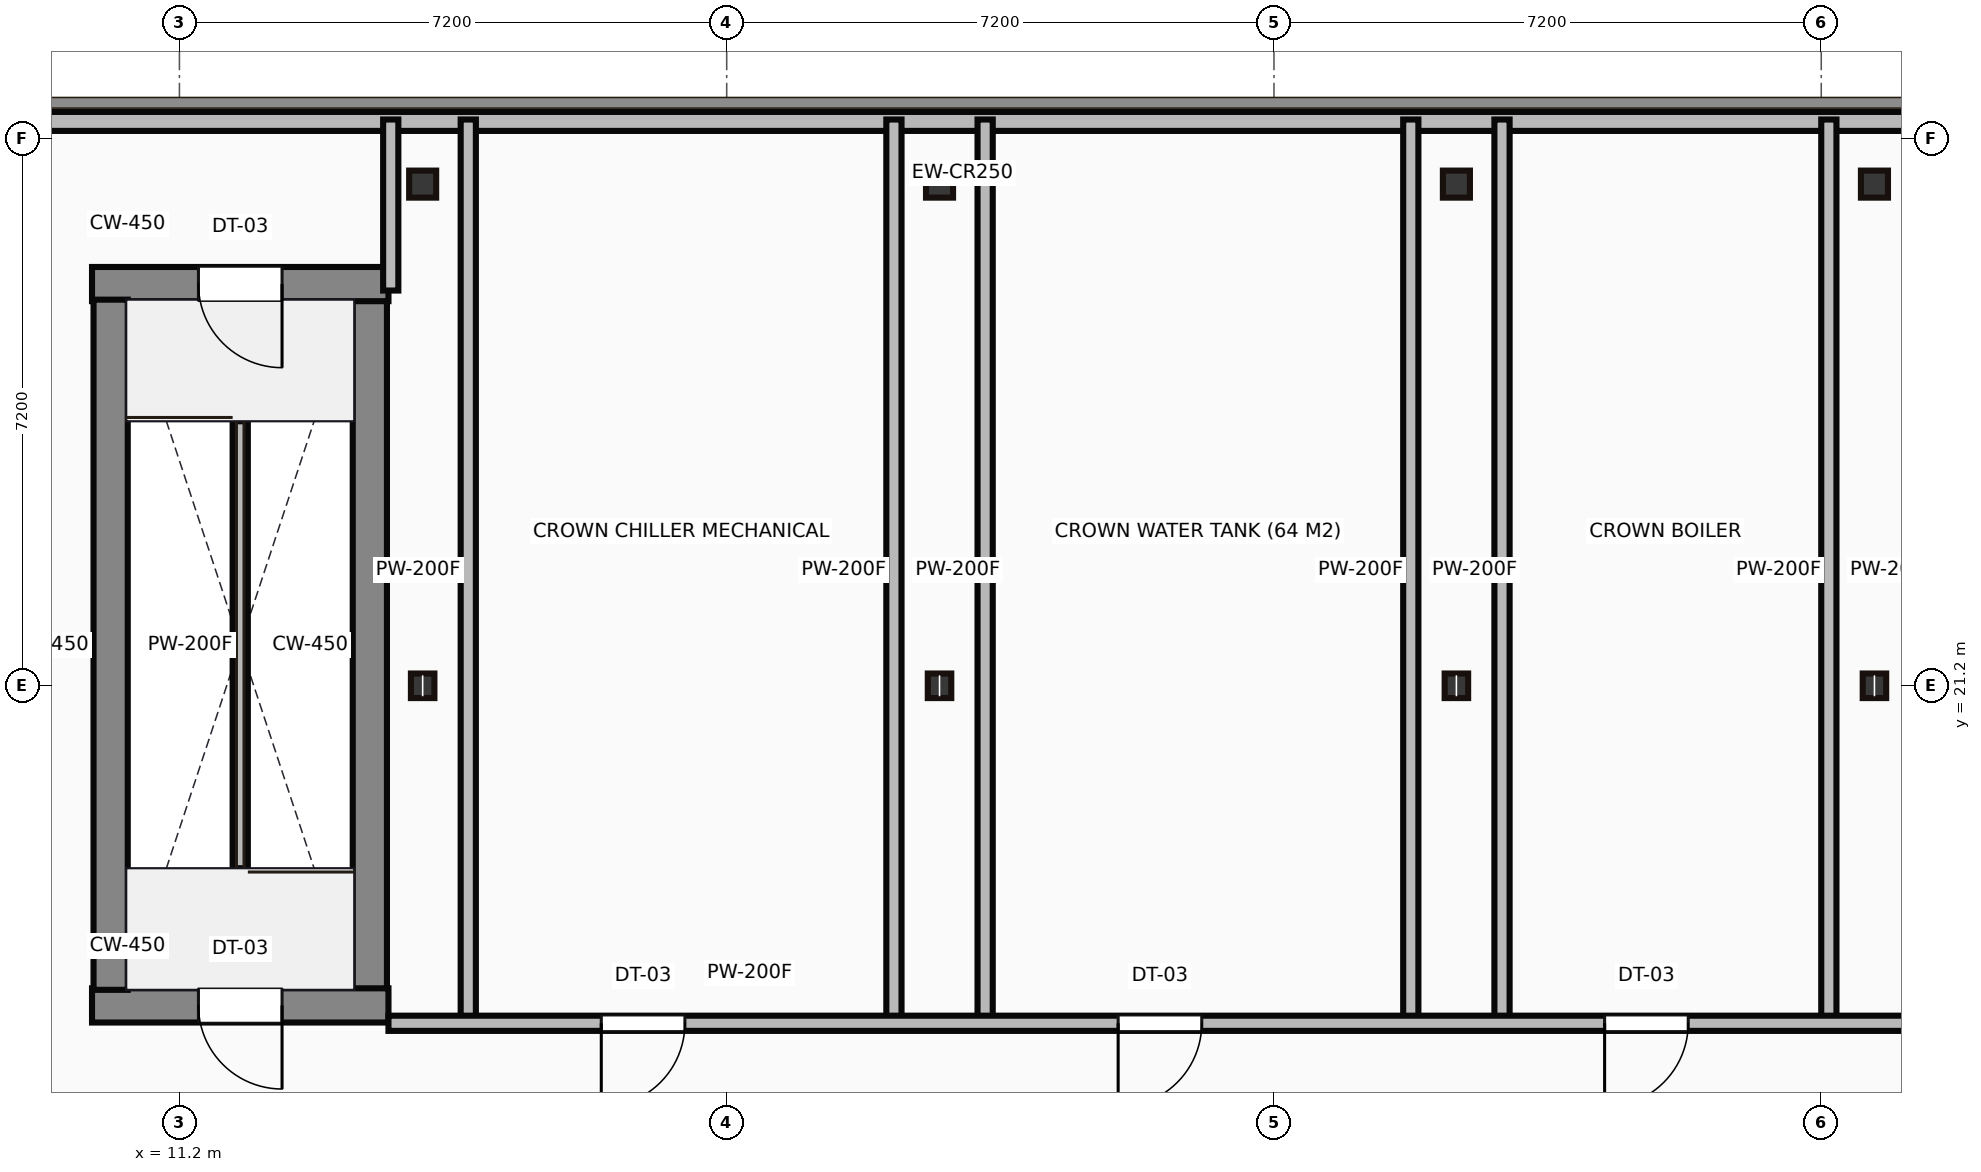
"""IFC4 building model, lengths in metres.
Left out: names, types, materials, properties, quantities, classifications, styles, units other than length and angle.
Written with IfcOpenShell. Run it as: python <this file> out.ifc"""

import sys

from ifc_helpers import new_model, si_unit, direction, frame, frame_2d, origin, origin_2d, place, context, subcontext, project, spatial, rectangle, hollow_rectangle, i_section, extrude, source, transform, mapped, element, fill, save


model = new_model("IFC4")
c1 = context("Model", 3, precision=1e-05, world=origin(), true_north=direction((0.0, 1.0)))
c2 = subcontext(c1, "Body", "Model", "MODEL_VIEW")
j1 = project(units=[si_unit("LENGTHUNIT", "METRE"), si_unit("PLANEANGLEUNIT", "RADIAN")], contexts=[c1])
p1 = place(None, origin())
s1 = spatial("IfcSite", under=j1, at=p1, CompositionType="ELEMENT")
p2 = place(p1, origin())
s2 = spatial("IfcBuilding", under=s1, at=p2, CompositionType="ELEMENT")
p3 = place(p2, frame((0.0, 0.0, 311.25)))
s3 = spatial("IfcBuildingStorey", under=s2, at=p3, CompositionType="ELEMENT", Elevation=311.25)
m1 = source(origin(), c2, "Body", "SweptSolid", [
    extrude(i_section(OverallWidth=0.309, OverallDepth=0.323, WebThickness=0.014, FlangeThickness=0.023, at=origin_2d()), origin(), (0.0, 0.0, 1.0), 3.8),
])
p4 = place(p3, frame((14.4, 21.2, 0.0), z_axis=(0.0, 0.0, 1.0), x_axis=(1.0, 0.0, 0.0)))
e1 = element("IfcColumn", 1, at=p4, inside=s3, PredefinedType="COLUMN", context=c2, shape_type="MappedRepresentation", body=[
    mapped(m1, transform((0.0, 0.0, 0.0))),
])
m2 = source(origin(), c2, "Body", "SweptSolid", [
    extrude(hollow_rectangle(XDim=0.356, YDim=0.356, WallThickness=0.019, at=origin_2d()), origin(), (0.0, 0.0, 1.0), 3.8),
])
p5 = place(p3, frame((14.4, 27.8, 0.0), z_axis=(0.0, 0.0, 1.0), x_axis=(1.0, 0.0, 0.0)))
e2 = element("IfcColumn", 2, at=p5, inside=s3, PredefinedType="COLUMN", context=c2, shape_type="MappedRepresentation", body=[
    mapped(m2, transform((0.0, 0.0, 0.0))),
])
p6 = place(p3, frame((21.2, 21.2, 0.0), z_axis=(0.0, 0.0, 1.0), x_axis=(1.0, 0.0, 0.0)))
e3 = element("IfcColumn", 3, at=p6, inside=s3, PredefinedType="COLUMN", context=c2, shape_type="MappedRepresentation", body=[
    mapped(m1, transform((0.0, 0.0, 0.0))),
])
p7 = place(p3, frame((21.2, 27.8, 0.0), z_axis=(0.0, 0.0, 1.0), x_axis=(1.0, 0.0, 0.0)))
e4 = element("IfcColumn", 4, at=p7, inside=s3, PredefinedType="COLUMN", context=c2, shape_type="MappedRepresentation", body=[
    mapped(m2, transform((0.0, 0.0, 0.0))),
])
p8 = place(p3, frame((28.0, 21.2, 0.0), z_axis=(0.0, 0.0, 1.0), x_axis=(1.0, 0.0, 0.0)))
e5 = element("IfcColumn", 5, at=p8, inside=s3, PredefinedType="COLUMN", context=c2, shape_type="MappedRepresentation", body=[
    mapped(m1, transform((0.0, 0.0, 0.0))),
])
p9 = place(p3, frame((28.0, 27.8, 0.0), z_axis=(0.0, 0.0, 1.0), x_axis=(1.0, 0.0, 0.0)))
e6 = element("IfcColumn", 6, at=p9, inside=s3, PredefinedType="COLUMN", context=c2, shape_type="MappedRepresentation", body=[
    mapped(m2, transform((0.0, 0.0, 0.0))),
])
p10 = place(p3, frame((33.5, 21.2, 0.0), z_axis=(0.0, 0.0, 1.0), x_axis=(1.0, 0.0, 0.0)))
e7 = element("IfcColumn", 7, at=p10, inside=s3, PredefinedType="COLUMN", context=c2, shape_type="MappedRepresentation", body=[
    mapped(m1, transform((0.0, 0.0, 0.0))),
])
p11 = place(p3, frame((33.5, 27.8, 0.0), z_axis=(0.0, 0.0, 1.0), x_axis=(1.0, 0.0, 0.0)))
e8 = element("IfcColumn", 8, at=p11, inside=s3, PredefinedType="COLUMN", context=c2, shape_type="MappedRepresentation", body=[
    mapped(m2, transform((0.0, 0.0, 0.0))),
])
m3 = source(origin(), c2, "Body", "SweptSolid", [
    extrude(rectangle(XDim=35.0, YDim=0.25, at=frame_2d((17.5, 0.0))), origin(), (0.0, 0.0, 1.0), 3.5),
])
p12 = place(p3, frame((39.0, 28.625, 0.0), z_axis=(0.0, 0.0, 1.0), x_axis=(-1.0, 0.0, 0.0)))
e9 = element("IfcWall", 9, at=p12, inside=s3, PredefinedType="STANDARD", context=c2, shape_type="MappedRepresentation", body=[
    mapped(m3, transform((0.0, 0.0, 0.0))),
])
m4 = source(origin(), c2, "Body", "SweptSolid", [
    extrude(rectangle(XDim=3.9, YDim=0.45, at=frame_2d((1.95, 0.0))), origin(), (0.0, 0.0, 1.0), 3.5),
])
p13 = place(p3, frame((10.05, 16.995, 0.0), z_axis=(0.0, 0.0, 1.0), x_axis=(1.0, 0.0, 0.0)))
e10 = element("IfcWall", 10, at=p13, inside=s3, PredefinedType="SHEAR", context=c2, shape_type="MappedRepresentation", body=[
    mapped(m4, transform((0.0, 0.0, 0.0))),
])
p14 = place(p13, frame((1.4, 0.0, 0.0)))
e11 = element("IfcOpeningElement", 11, at=p14, cuts=e10, PredefinedType="OPENING", context=c2, shape_type="SweptSolid", body=[
    extrude(rectangle(XDim=1.1, YDim=2.15, at=frame_2d((0.55, 1.075))), frame((0.0, 0.235, 0.0), z_axis=(0.0, -1.0, 0.0), x_axis=(1.0, 0.0, 0.0)), (0.0, 0.0, 1.0), 0.47),
])
m5 = source(origin(), c2, "Body", "SweptSolid", [
    extrude(rectangle(XDim=9.08, YDim=0.45, at=frame_2d((4.54, 0.0))), origin(), (0.0, 0.0, 1.0), 3.5),
])
for number, where, z_axis, x_axis in (
    (12, (10.295, 17.2, 0.0), (0.0, 0.0, 1.0), (0.0, 1.0, 0.0)),
    (13, (13.705, 17.2, 0.0), (0.0, 0.0, 1.0), (0.0, 1.0, 0.0)),
):
    element("IfcWall", number, at=place(p3, frame(where, z_axis=z_axis, x_axis=x_axis)), inside=s3, PredefinedType="SHEAR", context=c2, shape_type="MappedRepresentation", body=[
        mapped(m5, transform((0.0, 0.0, 0.0))),
    ])
p15 = place(p3, frame((10.05, 26.485, 0.0), z_axis=(0.0, 0.0, 1.0), x_axis=(1.0, 0.0, 0.0)))
e14 = element("IfcWall", 14, at=p15, inside=s3, PredefinedType="SHEAR", context=c2, shape_type="MappedRepresentation", body=[
    mapped(m4, transform((0.0, 0.0, 0.0))),
])
p16 = place(p15, frame((1.4, 0.0, 0.0)))
e15 = element("IfcOpeningElement", 15, at=p16, cuts=e14, PredefinedType="OPENING", context=c2, shape_type="SweptSolid", body=[
    extrude(rectangle(XDim=1.1, YDim=2.15, at=frame_2d((0.55, 1.075))), frame((0.0, 0.235, 0.0), z_axis=(0.0, -1.0, 0.0), x_axis=(1.0, 0.0, 0.0)), (0.0, 0.0, 1.0), 0.47),
])
m6 = source(origin(), c2, "Body", "SweptSolid", [
    extrude(rectangle(XDim=5.88, YDim=0.2, at=frame_2d((2.94, 0.0))), origin(), (0.0, 0.0, 1.0), 3.08),
])
p17 = place(p3, frame((12.0, 18.8, 0.0), z_axis=(0.0, 0.0, 1.0), x_axis=(0.0, 1.0, 0.0)))
e16 = element("IfcWall", 16, at=p17, inside=s3, PredefinedType="PARTITIONING", context=c2, shape_type="MappedRepresentation", body=[
    mapped(m6, transform((0.0, 0.0, 0.0))),
])
m7 = source(origin(), c2, "Body", "SweptSolid", [
    extrude(rectangle(XDim=21.6, YDim=0.2, at=frame_2d((10.8, 0.0))), origin(), (0.0, 0.0, 1.0), 3.5),
])
p18 = place(p3, frame((13.95, 16.76, 0.0), z_axis=(0.0, 0.0, 1.0), x_axis=(1.0, 0.0, 0.0)))
e17 = element("IfcWall", 17, at=p18, inside=s3, PredefinedType="PARTITIONING", context=c2, shape_type="MappedRepresentation", body=[
    mapped(m7, transform((0.0, 0.0, 0.0))),
])
p19 = place(p18, frame((2.8, 0.0, 0.0)))
e18 = element("IfcOpeningElement", 18, at=p19, cuts=e17, PredefinedType="OPENING", context=c2, shape_type="SweptSolid", body=[
    extrude(rectangle(XDim=1.1, YDim=2.15, at=frame_2d((0.55, 1.075))), frame((0.0, 0.11, 0.0), z_axis=(0.0, -1.0, 0.0), x_axis=(1.0, 0.0, 0.0)), (0.0, 0.0, 1.0), 0.22),
])
p20 = place(p18, frame((9.6, 0.0, 0.0)))
e19 = element("IfcOpeningElement", 19, at=p20, cuts=e17, PredefinedType="OPENING", context=c2, shape_type="SweptSolid", body=[
    extrude(rectangle(XDim=1.1, YDim=2.15, at=frame_2d((0.55, 1.075))), frame((0.0, 0.11, 0.0), z_axis=(0.0, -1.0, 0.0), x_axis=(1.0, 0.0, 0.0)), (0.0, 0.0, 1.0), 0.22),
])
p21 = place(p18, frame((16.0, 0.0, 0.0)))
e20 = element("IfcOpeningElement", 20, at=p21, cuts=e17, PredefinedType="OPENING", context=c2, shape_type="SweptSolid", body=[
    extrude(rectangle(XDim=1.1, YDim=2.15, at=frame_2d((0.55, 1.075))), frame((0.0, 0.11, 0.0), z_axis=(0.0, -1.0, 0.0), x_axis=(1.0, 0.0, 0.0)), (0.0, 0.0, 1.0), 0.22),
])
m8 = source(origin(), c2, "Body", "SweptSolid", [
    extrude(rectangle(XDim=2.25, YDim=0.2, at=frame_2d((1.125, 0.0))), origin(), (0.0, 0.0, 1.0), 3.5),
])
p22 = place(p3, frame((13.98, 26.4, 0.0), z_axis=(0.0, 0.0, 1.0), x_axis=(0.0, 1.0, 0.0)))
e21 = element("IfcWall", 21, at=p22, inside=s3, PredefinedType="PARTITIONING", context=c2, shape_type="MappedRepresentation", body=[
    mapped(m8, transform((0.0, 0.0, 0.0))),
])
m9 = source(origin(), c2, "Body", "SweptSolid", [
    extrude(rectangle(XDim=11.85, YDim=0.2, at=frame_2d((5.925, 0.0))), origin(), (0.0, 0.0, 1.0), 3.5),
])
for number, where, z_axis, x_axis in (
    (22, (15.0, 16.8, 0.0), (0.0, 0.0, 1.0), (0.0, 1.0, 0.0)),
    (23, (20.6, 16.8, 0.0), (0.0, 0.0, 1.0), (0.0, 1.0, 0.0)),
    (24, (21.8, 16.8, 0.0), (0.0, 0.0, 1.0), (0.0, 1.0, 0.0)),
    (25, (27.4, 16.8, 0.0), (0.0, 0.0, 1.0), (0.0, 1.0, 0.0)),
    (26, (28.6, 16.8, 0.0), (0.0, 0.0, 1.0), (0.0, 1.0, 0.0)),
    (27, (32.9, 16.8, 0.0), (0.0, 0.0, 1.0), (0.0, 1.0, 0.0)),
):
    element("IfcWall", number, at=place(p3, frame(where, z_axis=z_axis, x_axis=x_axis)), inside=s3, PredefinedType="PARTITIONING", context=c2, shape_type="MappedRepresentation", body=[
        mapped(m9, transform((0.0, 0.0, 0.0))),
    ])
m10 = source(origin(), c2, "Body", "SweptSolid", [
    extrude(rectangle(XDim=1.1, YDim=2.15, at=frame_2d((0.55, 1.075))), frame((0.0, 0.025, 0.0), z_axis=(0.0, -1.0, 0.0), x_axis=(1.0, 0.0, 0.0)), (0.0, 0.0, 1.0), 0.05),
])
p23 = place(p19, origin())
e28 = element("IfcDoor", 28, at=p23, inside=s3, OperationType="SINGLE_SWING_LEFT", PredefinedType="DOOR", context=c2, shape_type="MappedRepresentation", body=[
    mapped(m10, transform((0.0, 0.0, 0.0))),
])
fill(e18, e28)
p24 = place(p20, origin())
e29 = element("IfcDoor", 29, at=p24, inside=s3, OperationType="SINGLE_SWING_LEFT", PredefinedType="DOOR", context=c2, shape_type="MappedRepresentation", body=[
    mapped(m10, transform((0.0, 0.0, 0.0))),
])
fill(e19, e29)
p25 = place(p21, origin())
e30 = element("IfcDoor", 30, at=p25, inside=s3, OperationType="SINGLE_SWING_LEFT", PredefinedType="DOOR", context=c2, shape_type="MappedRepresentation", body=[
    mapped(m10, transform((0.0, 0.0, 0.0))),
])
fill(e20, e30)
p26 = place(p14, origin())
e31 = element("IfcDoor", 31, at=p26, inside=s3, OperationType="SINGLE_SWING_RIGHT", PredefinedType="DOOR", context=c2, shape_type="MappedRepresentation", body=[
    mapped(m10, transform((0.0, 0.0, 0.0))),
])
fill(e11, e31)
p27 = place(p16, frame((1.1, 0.0, 0.0), z_axis=(0.0, 0.0, 1.0), x_axis=(-1.0, 0.0, 0.0)))
e32 = element("IfcDoor", 32, at=p27, inside=s3, OperationType="SINGLE_SWING_RIGHT", PredefinedType="DOOR", context=c2, shape_type="MappedRepresentation", body=[
    mapped(m10, transform((0.0, 0.0, 0.0))),
])
fill(e15, e32)
save(model, sys.argv[1])
